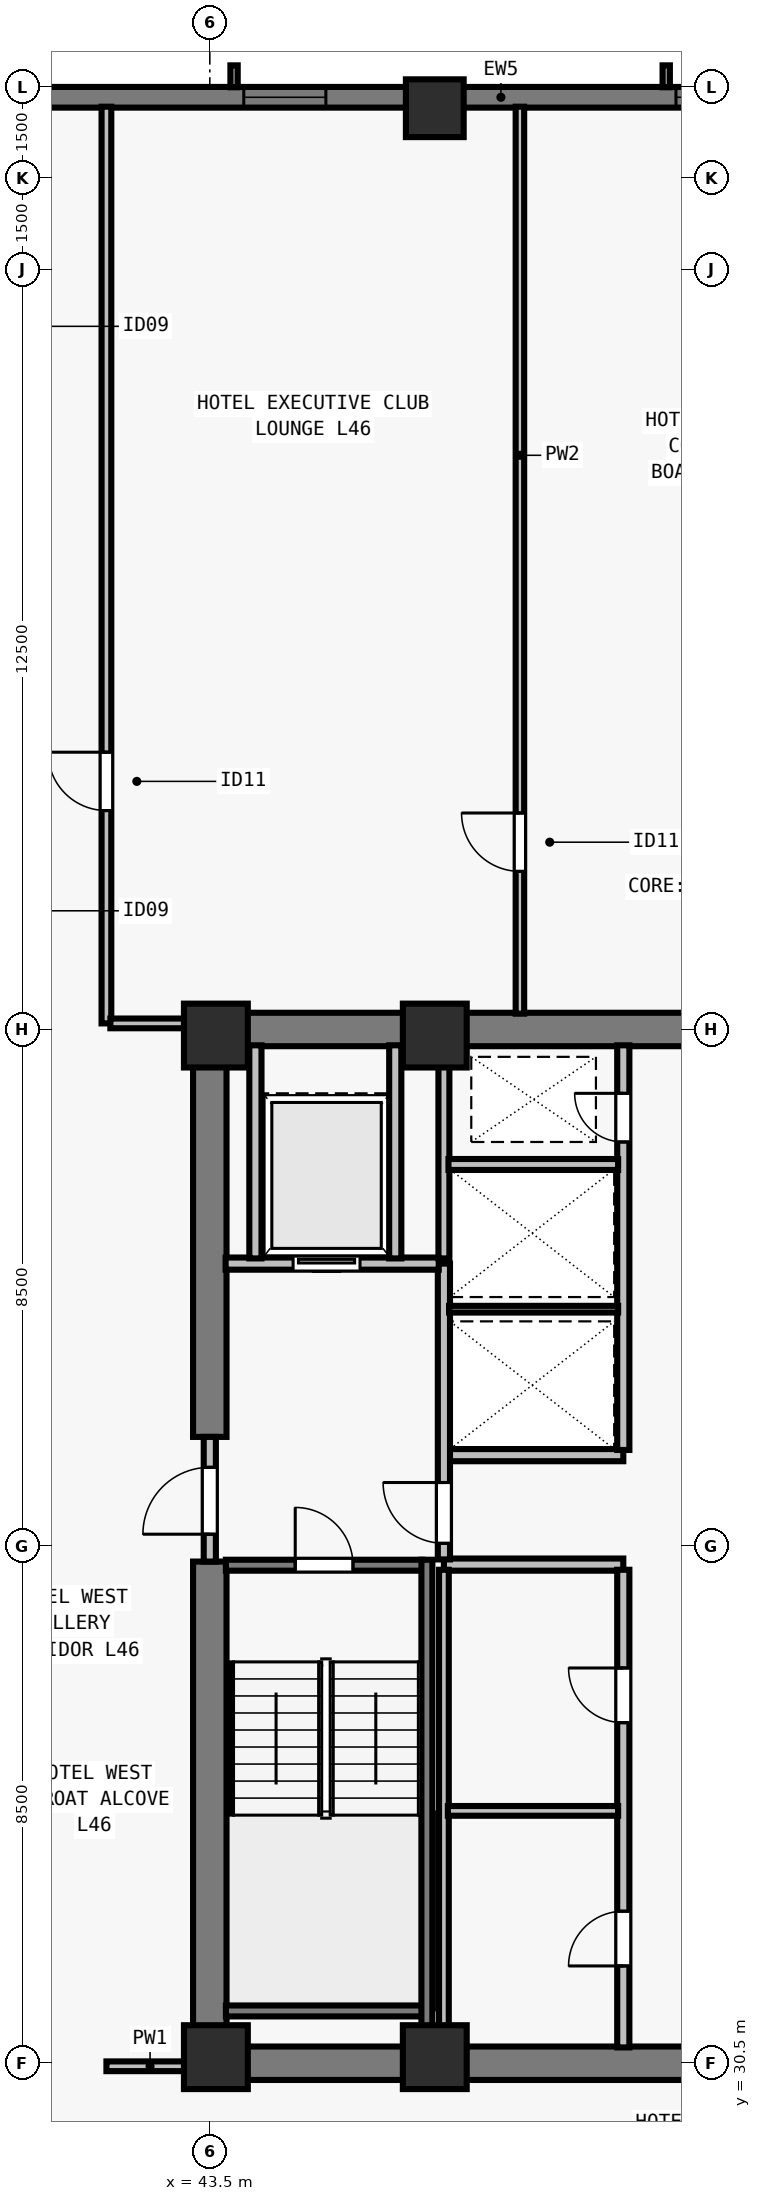
"""IFC4 building model, lengths in metres.
Left out: names, types, materials, properties, quantities, classifications, styles, units other than length and angle.
Written with IfcOpenShell. Run it as: python <this file> out.ifc"""

import sys

from ifc_helpers import new_model, si_unit, direction, frame, frame_2d, origin, origin_2d, place, context, subcontext, project, spatial, rectangle, extrude, element, fill, save


model = new_model("IFC4")
c1 = context("Model", 3, precision=1e-05, world=origin(), true_north=direction((0.0, 1.0)))
c2 = subcontext(c1, "Body", "Model", "MODEL_VIEW")
j1 = project(units=[si_unit("LENGTHUNIT", "METRE"), si_unit("PLANEANGLEUNIT", "RADIAN")], contexts=[c1])
p1 = place(None, origin())
s1 = spatial("IfcSite", under=j1, at=p1, CompositionType="ELEMENT")
p2 = place(p1, origin())
s2 = spatial("IfcBuilding", under=s1, at=p2, CompositionType="ELEMENT")
p3 = place(p2, frame((0.0, 0.0, 169.0)))
s3 = spatial("IfcBuildingStorey", under=s2, at=p3, CompositionType="ELEMENT", Elevation=169.0)
for number, where, z_axis, x_axis in (
    (1, (43.6, 30.6, 0.0), (0.0, 0.0, 1.0), (1.0, 0.0, 0.0)),
    (2, (47.2, 30.6, 0.0), (0.0, 0.0, 1.0), (1.0, 0.0, 0.0)),
    (3, (43.6, 47.4, 0.0), (0.0, 0.0, 1.0), (1.0, 0.0, 0.0)),
    (4, (47.2, 47.4, 0.0), (0.0, 0.0, 1.0), (1.0, 0.0, 0.0)),
):
    element("IfcColumn", number, at=place(p3, frame(where, z_axis=z_axis, x_axis=x_axis)), inside=s3, PredefinedType="COLUMN", context=c2, shape_type="SweptSolid", body=[
        extrude(rectangle(XDim=1.05, YDim=1.05, at=origin_2d()), origin(), (0.0, 0.0, 1.0), 3.5),
    ])
p4 = place(p3, frame((47.2, 62.65, 0.0), z_axis=(0.0, 0.0, 1.0), x_axis=(1.0, 0.0, 0.0)))
e5 = element("IfcColumn", 5, at=p4, inside=s3, PredefinedType="COLUMN", context=c2, shape_type="SweptSolid", body=[
    extrude(rectangle(XDim=0.95, YDim=0.95, at=origin_2d()), origin(), (0.0, 0.0, 1.0), 3.5),
])
p5 = place(p3, frame((32.0, 62.83, 0.0), z_axis=(0.0, 0.0, 1.0), x_axis=(1.0, 0.0, 0.0)))
e6 = element("IfcWall", 6, at=p5, inside=s3, PredefinedType="SOLIDWALL", context=c2, shape_type="SweptSolid", body=[
    extrude(rectangle(XDim=39.682, YDim=0.34, at=frame_2d((19.841, 0.0))), origin(), (0.0, 0.0, 1.0), 3.28),
])
p6 = place(p5, frame((4.952, 0.0, 0.8)))
e7 = element("IfcOpeningElement", 7, at=p6, cuts=e6, PredefinedType="OPENING", context=c2, shape_type="SweptSolid", body=[
    extrude(rectangle(XDim=1.35, YDim=1.66, at=frame_2d((0.675, 0.83))), frame((0.0, 0.18, 0.0), z_axis=(0.0, -1.0, 0.0), x_axis=(1.0, 0.0, 0.0)), (0.0, 0.0, 1.0), 0.36),
])
p7 = place(p5, frame((12.059, 0.0, 0.8)))
e8 = element("IfcOpeningElement", 8, at=p7, cuts=e6, PredefinedType="OPENING", context=c2, shape_type="SweptSolid", body=[
    extrude(rectangle(XDim=1.35, YDim=1.66, at=frame_2d((0.675, 0.83))), frame((0.0, 0.18, 0.0), z_axis=(0.0, -1.0, 0.0), x_axis=(1.0, 0.0, 0.0)), (0.0, 0.0, 1.0), 0.36),
])
p8 = place(p5, frame((19.166, 0.0, 0.8)))
e9 = element("IfcOpeningElement", 9, at=p8, cuts=e6, PredefinedType="OPENING", context=c2, shape_type="SweptSolid", body=[
    extrude(rectangle(XDim=1.35, YDim=1.66, at=frame_2d((0.675, 0.83))), frame((0.0, 0.18, 0.0), z_axis=(0.0, -1.0, 0.0), x_axis=(1.0, 0.0, 0.0)), (0.0, 0.0, 1.0), 0.36),
])
p9 = place(p5, frame((21.27, 0.0, 0.8)))
e10 = element("IfcOpeningElement", 10, at=p9, cuts=e6, PredefinedType="OPENING", context=c2, shape_type="SweptSolid", body=[
    extrude(rectangle(XDim=1.75, YDim=1.66, at=frame_2d((0.875, 0.83))), frame((0.0, 0.18, 0.0), z_axis=(0.0, -1.0, 0.0), x_axis=(1.0, 0.0, 0.0)), (0.0, 0.0, 1.0), 0.36),
])
p10 = place(p5, frame((26.273, 0.0, 0.8)))
e11 = element("IfcOpeningElement", 11, at=p10, cuts=e6, PredefinedType="OPENING", context=c2, shape_type="SweptSolid", body=[
    extrude(rectangle(XDim=1.35, YDim=1.66, at=frame_2d((0.675, 0.83))), frame((0.0, 0.18, 0.0), z_axis=(0.0, -1.0, 0.0), x_axis=(1.0, 0.0, 0.0)), (0.0, 0.0, 1.0), 0.36),
])
p11 = place(p5, frame((29.627, 0.0, 0.8)))
e12 = element("IfcOpeningElement", 12, at=p11, cuts=e6, PredefinedType="OPENING", context=c2, shape_type="SweptSolid", body=[
    extrude(rectangle(XDim=1.75, YDim=1.66, at=frame_2d((0.875, 0.83))), frame((0.0, 0.18, 0.0), z_axis=(0.0, -1.0, 0.0), x_axis=(1.0, 0.0, 0.0)), (0.0, 0.0, 1.0), 0.36),
])
p12 = place(p5, frame((34.47, 0.0, 0.8)))
e13 = element("IfcOpeningElement", 13, at=p12, cuts=e6, PredefinedType="OPENING", context=c2, shape_type="SweptSolid", body=[
    extrude(rectangle(XDim=0.9, YDim=1.66, at=frame_2d((0.45, 0.83))), frame((0.0, 0.18, 0.0), z_axis=(0.0, -1.0, 0.0), x_axis=(1.0, 0.0, 0.0)), (0.0, 0.0, 1.0), 0.36),
])
for number, where, z_axis, x_axis in (
    (14, (43.225, 30.5, 0.0), (0.0, 0.0, 1.0), (1.0, 0.0, 0.0)),
    (15, (43.225, 47.5, 0.0), (0.0, 0.0, 1.0), (1.0, 0.0, 0.0)),
):
    element("IfcWall", number, at=place(p3, frame(where, z_axis=z_axis, x_axis=x_axis)), inside=s3, PredefinedType="SHEAR", context=c2, shape_type="SweptSolid", body=[
        extrude(rectangle(XDim=17.55, YDim=0.55, at=frame_2d((8.775, 0.0))), origin(), (0.0, 0.0, 1.0), 3.28),
    ])
p13 = place(p3, frame((43.5, 30.765, 0.0), z_axis=(0.0, 0.0, 1.0), x_axis=(0.0, 1.0, 0.0)))
e16 = element("IfcWall", 16, at=p13, inside=s3, PredefinedType="SHEAR", context=c2, shape_type="SweptSolid", body=[
    extrude(rectangle(XDim=7.985, YDim=0.55, at=frame_2d((3.993, 0.0))), origin(), (0.0, 0.0, 1.0), 3.28),
])
p14 = place(p3, frame((43.5, 40.8, 0.0), z_axis=(0.0, 0.0, 1.0), x_axis=(0.0, 1.0, 0.0)))
e17 = element("IfcWall", 17, at=p14, inside=s3, PredefinedType="SHEAR", context=c2, shape_type="SweptSolid", body=[
    extrude(rectangle(XDim=6.435, YDim=0.55, at=frame_2d((3.218, 0.0))), origin(), (0.0, 0.0, 1.0), 3.28),
])
for number, where, z_axis, x_axis in (
    (18, (47.35, 38.7, 0.0), (0.0, 0.0, 1.0), (1.0, 0.0, 0.0)),
    (19, (47.35, 40.5, 0.0), (0.0, 0.0, 1.0), (1.0, 0.0, 0.0)),
):
    element("IfcWall", number, at=place(p3, frame(where, z_axis=z_axis, x_axis=x_axis)), inside=s3, PredefinedType="SOLIDWALL", context=c2, shape_type="SweptSolid", body=[
        extrude(rectangle(XDim=2.95, YDim=0.2, at=frame_2d((1.475, 0.0))), origin(), (0.0, 0.0, 1.0), 3.28),
    ])
p15 = place(p3, frame((50.3, 30.76, 0.0), z_axis=(0.0, 0.0, 1.0), x_axis=(0.0, 1.0, 0.0)))
e20 = element("IfcWall", 20, at=p15, inside=s3, PredefinedType="SOLIDWALL", context=c2, shape_type="SweptSolid", body=[
    extrude(rectangle(XDim=7.855, YDim=0.2, at=frame_2d((3.927, 0.0))), origin(), (0.0, 0.0, 1.0), 3.28),
])
p16 = place(p15, frame((1.34, 0.0, 0.0)))
e21 = element("IfcOpeningElement", 21, at=p16, cuts=e20, PredefinedType="OPENING", context=c2, shape_type="SweptSolid", body=[
    extrude(rectangle(XDim=0.9, YDim=2.12, at=frame_2d((0.45, 1.06))), frame((0.0, 0.11, 0.0), z_axis=(0.0, -1.0, 0.0), x_axis=(1.0, 0.0, 0.0)), (0.0, 0.0, 1.0), 0.22),
])
p17 = place(p15, frame((5.34, 0.0, 0.0)))
e22 = element("IfcOpeningElement", 22, at=p17, cuts=e20, PredefinedType="OPENING", context=c2, shape_type="SweptSolid", body=[
    extrude(rectangle(XDim=0.9, YDim=2.12, at=frame_2d((0.45, 1.06))), frame((0.0, 0.11, 0.0), z_axis=(0.0, -1.0, 0.0), x_axis=(1.0, 0.0, 0.0)), (0.0, 0.0, 1.0), 0.22),
])
p18 = place(p3, frame((50.3, 40.585, 0.0), z_axis=(0.0, 0.0, 1.0), x_axis=(0.0, 1.0, 0.0)))
e23 = element("IfcWall", 23, at=p18, inside=s3, PredefinedType="SOLIDWALL", context=c2, shape_type="SweptSolid", body=[
    extrude(rectangle(XDim=6.655, YDim=0.2, at=frame_2d((3.328, 0.0))), origin(), (0.0, 0.0, 1.0), 3.28),
])
p19 = place(p18, frame((5.065, 0.0, 0.0)))
e24 = element("IfcOpeningElement", 24, at=p19, cuts=e23, PredefinedType="OPENING", context=c2, shape_type="SweptSolid", body=[
    extrude(rectangle(XDim=0.8, YDim=2.08, at=frame_2d((0.4, 1.04))), frame((0.0, 0.11, 0.0), z_axis=(0.0, -1.0, 0.0), x_axis=(1.0, 0.0, 0.0)), (0.0, 0.0, 1.0), 0.22),
])
p20 = place(p3, frame((43.5, 38.75, 0.0), z_axis=(0.0, 0.0, 1.0), x_axis=(0.0, 1.0, 0.0)))
e25 = element("IfcWall", 25, at=p20, inside=s3, PredefinedType="SOLIDWALL", context=c2, shape_type="SweptSolid", body=[
    extrude(rectangle(XDim=2.05, YDim=0.2, at=frame_2d((1.025, 0.0))), origin(), (0.0, 0.0, 1.0), 3.28),
])
p21 = place(p20, frame((0.45, 0.0, 0.0)))
e26 = element("IfcOpeningElement", 26, at=p21, cuts=e25, PredefinedType="OPENING", context=c2, shape_type="SweptSolid", body=[
    extrude(rectangle(XDim=1.1, YDim=2.15, at=frame_2d((0.55, 1.075))), frame((0.0, 0.11, 0.0), z_axis=(0.0, -1.0, 0.0), x_axis=(1.0, 0.0, 0.0)), (0.0, 0.0, 1.0), 0.22),
])
p22 = place(p3, frame((47.35, 38.785, 0.0), z_axis=(0.0, 0.0, 1.0), x_axis=(0.0, 1.0, 0.0)))
e27 = element("IfcWall", 27, at=p22, inside=s3, PredefinedType="SOLIDWALL", context=c2, shape_type="SweptSolid", body=[
    extrude(rectangle(XDim=4.865, YDim=0.2, at=frame_2d((2.433, 0.0))), origin(), (0.0, 0.0, 1.0), 3.28),
])
p23 = place(p22, frame((0.265, 0.0, 0.0)))
e28 = element("IfcOpeningElement", 28, at=p23, cuts=e27, PredefinedType="OPENING", context=c2, shape_type="SweptSolid", body=[
    extrude(rectangle(XDim=1.0, YDim=2.15, at=frame_2d((0.5, 1.075))), frame((0.0, 0.11, 0.0), z_axis=(0.0, -1.0, 0.0), x_axis=(1.0, 0.0, 0.0)), (0.0, 0.0, 1.0), 0.22),
])
p24 = place(p3, frame((43.76, 43.65, 0.0), z_axis=(0.0, 0.0, 1.0), x_axis=(1.0, 0.0, 0.0)))
e29 = element("IfcWall", 29, at=p24, inside=s3, PredefinedType="SOLIDWALL", context=c2, shape_type="SweptSolid", body=[
    extrude(rectangle(XDim=3.505, YDim=0.2, at=frame_2d((1.752, 0.0))), origin(), (0.0, 0.0, 1.0), 3.28),
])
p25 = place(p24, frame((1.11, 0.0, 0.0)))
e30 = element("IfcOpeningElement", 30, at=p25, cuts=e29, PredefinedType="OPENING", context=c2, shape_type="SweptSolid", body=[
    extrude(rectangle(XDim=1.1, YDim=2.2, at=frame_2d((0.55, 1.1))), frame((0.0, 0.11, 0.0), z_axis=(0.0, -1.0, 0.0), x_axis=(1.0, 0.0, 0.0)), (0.0, 0.0, 1.0), 0.22),
])
for number, where, z_axis, x_axis in (
    (31, (46.55, 43.735, 0.0), (0.0, 0.0, 1.0), (0.0, 1.0, 0.0)),
    (32, (44.25, 43.735, 0.0), (0.0, 0.0, 1.0), (0.0, 1.0, 0.0)),
):
    element("IfcWall", number, at=place(p3, frame(where, z_axis=z_axis, x_axis=x_axis)), inside=s3, PredefinedType="SOLIDWALL", context=c2, shape_type="SweptSolid", body=[
        extrude(rectangle(XDim=3.505, YDim=0.2, at=frame_2d((1.752, 0.0))), origin(), (0.0, 0.0, 1.0), 3.28),
    ])
p26 = place(p3, frame((47.35, 30.76, 0.0), z_axis=(0.0, 0.0, 1.0), x_axis=(0.0, 1.0, 0.0)))
e33 = element("IfcWall", 33, at=p26, inside=s3, PredefinedType="PARTITIONING", context=c2, shape_type="SweptSolid", body=[
    extrude(rectangle(XDim=7.855, YDim=0.16, at=frame_2d((3.927, 0.0))), origin(), (0.0, 0.0, 1.0), 3.28),
])
p27 = place(p3, frame((47.415, 34.65, 0.0), z_axis=(0.0, 0.0, 1.0), x_axis=(1.0, 0.0, 0.0)))
e34 = element("IfcWall", 34, at=p27, inside=s3, PredefinedType="PARTITIONING", context=c2, shape_type="SweptSolid", body=[
    extrude(rectangle(XDim=2.8, YDim=0.16, at=frame_2d((1.4, 0.0))), origin(), (0.0, 0.0, 1.0), 3.28),
])
p28 = place(p3, frame((47.35, 43.735, 0.0), z_axis=(0.0, 0.0, 1.0), x_axis=(0.0, 1.0, 0.0)))
e35 = element("IfcWall", 35, at=p28, inside=s3, PredefinedType="SOLIDWALL", context=c2, shape_type="SweptSolid", body=[
    extrude(rectangle(XDim=3.505, YDim=0.18, at=frame_2d((1.752, 0.0))), origin(), (0.0, 0.0, 1.0), 3.28),
])
p29 = place(p3, frame((47.435, 42.9, 0.0), z_axis=(0.0, 0.0, 1.0), x_axis=(1.0, 0.0, 0.0)))
e36 = element("IfcWall", 36, at=p29, inside=s3, PredefinedType="PARTITIONING", context=c2, shape_type="SweptSolid", body=[
    extrude(rectangle(XDim=2.78, YDim=0.11, at=frame_2d((1.39, 0.0))), origin(), (0.0, 0.0, 1.0), 3.28),
])
p30 = place(p3, frame((47.425, 45.28, 0.0), z_axis=(0.0, 0.0, 1.0), x_axis=(1.0, 0.0, 0.0)))
e37 = element("IfcWall", 37, at=p30, inside=s3, PredefinedType="SOLIDWALL", context=c2, shape_type="SweptSolid", body=[
    extrude(rectangle(XDim=2.79, YDim=0.18, at=frame_2d((1.395, 0.0))), origin(), (0.0, 0.0, 1.0), 3.28),
])
p31 = place(p3, frame((41.8, 47.6, 0.0), z_axis=(0.0, 0.0, 1.0), x_axis=(0.0, 1.0, 0.0)))
e38 = element("IfcWall", 38, at=p31, inside=s3, PredefinedType="PARTITIONING", context=c2, shape_type="SweptSolid", body=[
    extrude(rectangle(XDim=15.075, YDim=0.16, at=frame_2d((7.538, 0.0))), origin(), (0.0, 0.0, 1.0), 2.555),
])
p32 = place(p31, frame((3.5, 0.0, 0.0)))
e39 = element("IfcOpeningElement", 39, at=p32, cuts=e38, PredefinedType="OPENING", context=c2, shape_type="SweptSolid", body=[
    extrude(rectangle(XDim=0.96, YDim=2.12, at=frame_2d((0.48, 1.06))), frame((0.0, 0.09, 0.0), z_axis=(0.0, -1.0, 0.0), x_axis=(1.0, 0.0, 0.0)), (0.0, 0.0, 1.0), 0.18),
])
p33 = place(p3, frame((41.8, 30.45, 0.0), z_axis=(0.0, 0.0, 1.0), x_axis=(1.0, 0.0, 0.0)))
e40 = element("IfcWall", 40, at=p33, inside=s3, PredefinedType="PARTITIONING", context=c2, shape_type="SweptSolid", body=[
    extrude(rectangle(XDim=1.435, YDim=0.16, at=frame_2d((0.718, 0.0))), origin(), (0.0, 0.0, 1.0), 3.28),
])
p34 = place(p3, frame((41.865, 47.6, 0.0), z_axis=(0.0, 0.0, 1.0), x_axis=(1.0, 0.0, 0.0)))
e41 = element("IfcWall", 41, at=p34, inside=s3, PredefinedType="PARTITIONING", context=c2, shape_type="SweptSolid", body=[
    extrude(rectangle(XDim=1.37, YDim=0.16, at=frame_2d((0.685, 0.0))), origin(), (0.0, 0.0, 1.0), 3.28),
])
p35 = place(p3, frame((48.6, 47.76, 0.0), z_axis=(0.0, 0.0, 1.0), x_axis=(0.0, 1.0, 0.0)))
e42 = element("IfcWall", 42, at=p35, inside=s3, PredefinedType="PARTITIONING", context=c2, shape_type="SweptSolid", body=[
    extrude(rectangle(XDim=14.915, YDim=0.14, at=frame_2d((7.458, 0.0))), origin(), (0.0, 0.0, 1.0), 2.896),
])
p36 = place(p35, frame((2.34, 0.0, 0.0)))
e43 = element("IfcOpeningElement", 43, at=p36, cuts=e42, PredefinedType="OPENING", context=c2, shape_type="SweptSolid", body=[
    extrude(rectangle(XDim=0.96, YDim=2.12, at=frame_2d((0.48, 1.06))), frame((0.0, 0.08, 0.0), z_axis=(0.0, -1.0, 0.0), x_axis=(1.0, 0.0, 0.0)), (0.0, 0.0, 1.0), 0.16),
])
p37 = place(p3, frame((43.765, 38.69, 0.0), z_axis=(0.0, 0.0, 1.0), x_axis=(1.0, 0.0, 0.0)))
e44 = element("IfcWall", 44, at=p37, inside=s3, PredefinedType="SOLIDWALL", context=c2, shape_type="SweptSolid", body=[
    extrude(rectangle(XDim=3.23, YDim=0.18, at=frame_2d((1.615, 0.0))), origin(), (0.0, 0.0, 1.0), 3.28),
])
p38 = place(p37, frame((1.14, 0.0, 0.0)))
e45 = element("IfcOpeningElement", 45, at=p38, cuts=e44, PredefinedType="OPENING", context=c2, shape_type="SweptSolid", body=[
    extrude(rectangle(XDim=0.95, YDim=2.15, at=frame_2d((0.475, 1.075))), frame((0.0, 0.1, 0.0), z_axis=(0.0, -1.0, 0.0), x_axis=(1.0, 0.0, 0.0)), (0.0, 0.0, 1.0), 0.2),
])
p39 = place(p3, frame((43.765, 31.36, 0.0), z_axis=(0.0, 0.0, 1.0), x_axis=(1.0, 0.0, 0.0)))
e46 = element("IfcWall", 46, at=p39, inside=s3, PredefinedType="SOLIDWALL", context=c2, shape_type="SweptSolid", body=[
    extrude(rectangle(XDim=3.23, YDim=0.18, at=frame_2d((1.615, 0.0))), origin(), (0.0, 0.0, 1.0), 3.28),
])
p40 = place(p3, frame((47.07, 38.78, 0.0), z_axis=(0.0, 0.0, 1.0), x_axis=(0.0, -1.0, 0.0)))
e47 = element("IfcWall", 47, at=p40, inside=s3, PredefinedType="SOLIDWALL", context=c2, shape_type="SweptSolid", body=[
    extrude(rectangle(XDim=8.017, YDim=0.18, at=frame_2d((4.009, 0.0))), origin(), (0.0, 0.0, 1.0), 3.28),
])
p41 = place(p7, origin())
e48 = element("IfcWindow", 48, at=p41, inside=s3, PartitioningType="SINGLE_PANEL", PredefinedType="WINDOW", context=c2, shape_type="SweptSolid", body=[
    extrude(rectangle(XDim=1.35, YDim=1.66, at=frame_2d((0.675, 0.83))), frame((0.0, -0.05, 0.0), z_axis=(0.0, -1.0, 0.0), x_axis=(1.0, 0.0, 0.0)), (0.0, 0.0, 1.0), 0.06),
])
fill(e8, e48)
p42 = place(p8, origin())
e49 = element("IfcWindow", 49, at=p42, inside=s3, PartitioningType="SINGLE_PANEL", PredefinedType="WINDOW", context=c2, shape_type="SweptSolid", body=[
    extrude(rectangle(XDim=1.35, YDim=1.66, at=frame_2d((0.675, 0.83))), frame((0.0, -0.05, 0.0), z_axis=(0.0, -1.0, 0.0), x_axis=(1.0, 0.0, 0.0)), (0.0, 0.0, 1.0), 0.06),
])
fill(e9, e49)
p43 = place(p21, origin())
e50 = element("IfcDoor", 50, at=p43, inside=s3, OperationType="SINGLE_SWING_LEFT", PredefinedType="DOOR", context=c2, shape_type="SweptSolid", body=[
    extrude(rectangle(XDim=1.1, YDim=2.15, at=frame_2d((0.55, 1.075))), frame((0.0, 0.025, 0.0), z_axis=(0.0, -1.0, 0.0), x_axis=(1.0, 0.0, 0.0)), (0.0, 0.0, 1.0), 0.05),
])
fill(e26, e50)
p44 = place(p23, origin())
e51 = element("IfcDoor", 51, at=p44, inside=s3, OperationType="SINGLE_SWING_RIGHT", PredefinedType="DOOR", context=c2, shape_type="SweptSolid", body=[
    extrude(rectangle(XDim=1.0, YDim=2.15, at=frame_2d((0.5, 1.075))), frame((0.0, 0.025, 0.0), z_axis=(0.0, -1.0, 0.0), x_axis=(1.0, 0.0, 0.0)), (0.0, 0.0, 1.0), 0.05),
])
fill(e28, e51)
p45 = place(p25, origin())
e52 = element("IfcDoor", 52, at=p45, inside=s3, OperationType="SLIDING_TO_LEFT", PredefinedType="DOOR", context=c2, shape_type="SweptSolid", body=[
    extrude(rectangle(XDim=1.1, YDim=2.2, at=frame_2d((0.55, 1.1))), frame((0.0, 0.025, 0.0), z_axis=(0.0, -1.0, 0.0), x_axis=(1.0, 0.0, 0.0)), (0.0, 0.0, 1.0), 0.05),
])
fill(e30, e52)
p46 = place(p16, origin())
e53 = element("IfcDoor", 53, at=p46, inside=s3, OperationType="SINGLE_SWING_LEFT", PredefinedType="DOOR", context=c2, shape_type="SweptSolid", body=[
    extrude(rectangle(XDim=0.9, YDim=2.12, at=frame_2d((0.45, 1.06))), frame((0.0, 0.025, 0.0), z_axis=(0.0, -1.0, 0.0), x_axis=(1.0, 0.0, 0.0)), (0.0, 0.0, 1.0), 0.05),
])
fill(e21, e53)
p47 = place(p17, origin())
e54 = element("IfcDoor", 54, at=p47, inside=s3, OperationType="SINGLE_SWING_RIGHT", PredefinedType="DOOR", context=c2, shape_type="SweptSolid", body=[
    extrude(rectangle(XDim=0.9, YDim=2.12, at=frame_2d((0.45, 1.06))), frame((0.0, 0.025, 0.0), z_axis=(0.0, -1.0, 0.0), x_axis=(1.0, 0.0, 0.0)), (0.0, 0.0, 1.0), 0.05),
])
fill(e22, e54)
p48 = place(p19, origin())
e55 = element("IfcDoor", 55, at=p48, inside=s3, OperationType="SINGLE_SWING_RIGHT", PredefinedType="DOOR", context=c2, shape_type="SweptSolid", body=[
    extrude(rectangle(XDim=0.8, YDim=2.08, at=frame_2d((0.4, 1.04))), frame((0.0, 0.025, 0.0), z_axis=(0.0, -1.0, 0.0), x_axis=(1.0, 0.0, 0.0)), (0.0, 0.0, 1.0), 0.05),
])
fill(e24, e55)
p49 = place(p32, origin())
e56 = element("IfcDoor", 56, at=p49, inside=s3, OperationType="SINGLE_SWING_RIGHT", PredefinedType="DOOR", context=c2, shape_type="SweptSolid", body=[
    extrude(rectangle(XDim=0.96, YDim=2.12, at=frame_2d((0.48, 1.06))), frame((0.0, 0.025, 0.0), z_axis=(0.0, -1.0, 0.0), x_axis=(1.0, 0.0, 0.0)), (0.0, 0.0, 1.0), 0.05),
])
fill(e39, e56)
p50 = place(p36, origin())
e57 = element("IfcDoor", 57, at=p50, inside=s3, OperationType="SINGLE_SWING_RIGHT", PredefinedType="DOOR", context=c2, shape_type="SweptSolid", body=[
    extrude(rectangle(XDim=0.96, YDim=2.12, at=frame_2d((0.48, 1.06))), frame((0.0, 0.025, 0.0), z_axis=(0.0, -1.0, 0.0), x_axis=(1.0, 0.0, 0.0)), (0.0, 0.0, 1.0), 0.05),
])
fill(e43, e57)
p51 = place(p38, origin())
e58 = element("IfcDoor", 58, at=p51, inside=s3, OperationType="SINGLE_SWING_LEFT", PredefinedType="DOOR", context=c2, shape_type="SweptSolid", body=[
    extrude(rectangle(XDim=0.95, YDim=2.15, at=frame_2d((0.475, 1.075))), frame((0.0, 0.025, 0.0), z_axis=(0.0, -1.0, 0.0), x_axis=(1.0, 0.0, 0.0)), (0.0, 0.0, 1.0), 0.05),
])
fill(e45, e58)
save(model, sys.argv[1])
